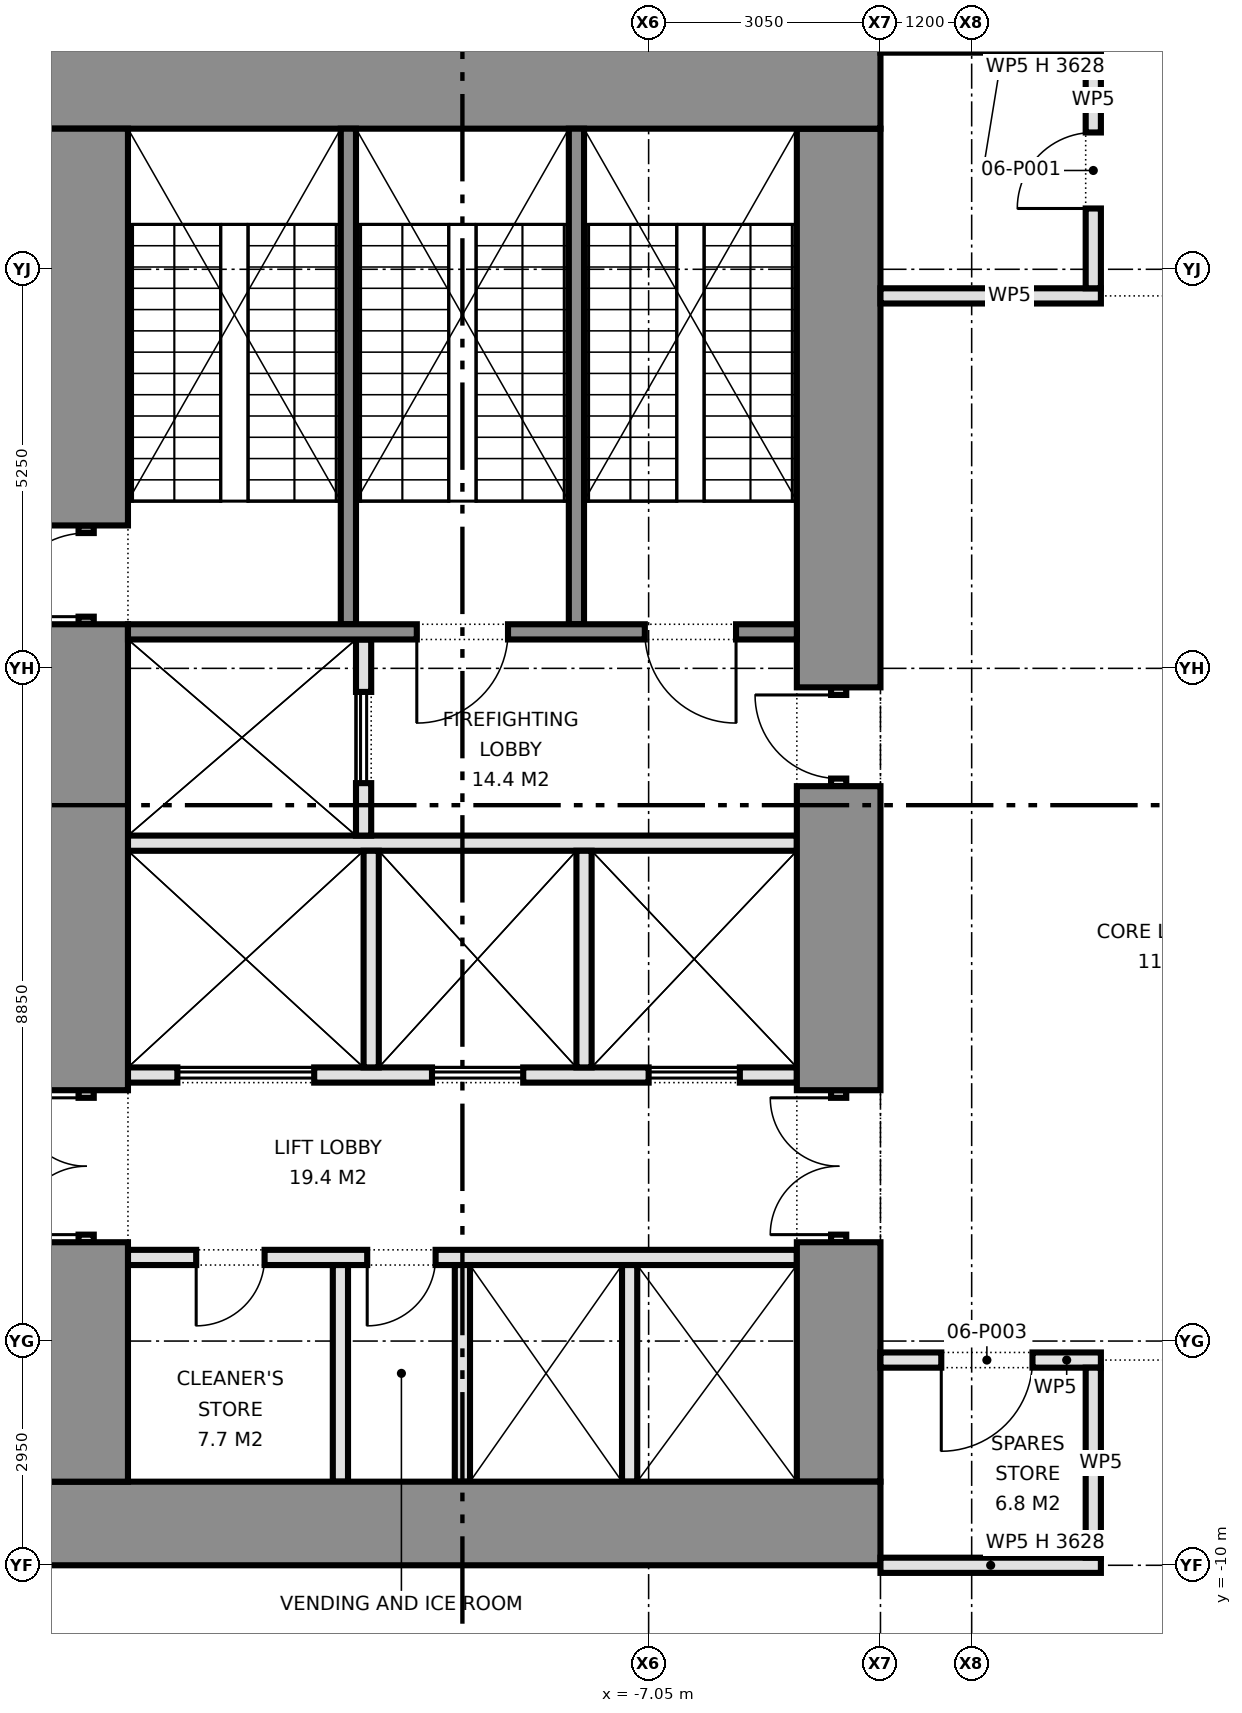
"""IFC4 building model, lengths in metres.
Left out: names, types, materials, properties, quantities, classifications, styles, units other than length and angle.
Written with IfcOpenShell. Run it as: python <this file> out.ifc"""

import sys

from ifc_helpers import new_model, si_unit, direction, frame, frame_2d, origin, place, context, subcontext, project, spatial, rectangle, extrude, element, fill, save


model = new_model("IFC4")
c1 = context("Model", 3, precision=1e-05, world=origin(), true_north=direction((0.0, 1.0)))
c2 = subcontext(c1, "Body", "Model", "MODEL_VIEW")
j1 = project(units=[si_unit("LENGTHUNIT", "METRE"), si_unit("PLANEANGLEUNIT", "RADIAN")], contexts=[c1])
p1 = place(None, origin())
s1 = spatial("IfcSite", under=j1, at=p1, CompositionType="ELEMENT")
p2 = place(p1, origin())
s2 = spatial("IfcBuilding", under=s1, at=p2, CompositionType="ELEMENT")
p3 = place(p2, frame((0.0, 0.0, 25.7)))
s3 = spatial("IfcBuildingStorey", under=s2, at=p3, CompositionType="ELEMENT", Elevation=25.7)
for number, where, z_axis, x_axis in (
    (1, (-15.0, -9.45, 0.0), (0.0, 0.0, 1.0), (1.0, 0.0, 0.0)),
    (2, (-15.0, 9.45, 0.0), (0.0, 0.0, 1.0), (1.0, 0.0, 0.0)),
):
    element("IfcWall", number, at=place(p3, frame(where, z_axis=z_axis, x_axis=x_axis)), inside=s3, PredefinedType="SHEAR", context=c2, shape_type="SweptSolid", body=[
        extrude(rectangle(XDim=11.0, YDim=1.1, at=frame_2d((5.5, 0.0))), origin(), (0.0, 0.0, 1.0), 4.575),
    ])
p4 = place(p3, frame((-14.45, -8.9, 0.0), z_axis=(0.0, 0.0, 1.0), x_axis=(0.0, 1.0, 0.0)))
e3 = element("IfcWall", 3, at=p4, inside=s3, PredefinedType="SHEAR", context=c2, shape_type="SweptSolid", body=[
    extrude(rectangle(XDim=3.15, YDim=1.1, at=frame_2d((1.575, 0.0))), origin(), (0.0, 0.0, 1.0), 4.575),
])
p5 = place(p3, frame((-14.45, -5.75, 0.0), z_axis=(0.0, 0.0, 1.0), x_axis=(0.0, 1.0, 0.0)))
e4 = element("IfcWall", 4, at=p5, inside=s3, PredefinedType="PARTITIONING", context=c2, shape_type="SweptSolid", body=[
    extrude(rectangle(XDim=2.0, YDim=0.2, at=frame_2d((1.0, 0.0))), origin(), (0.0, 0.0, 1.0), 2.4),
])
p6 = place(p5, frame((0.1, 0.0, 0.0)))
e5 = element("IfcOpeningElement", 5, at=p6, cuts=e4, PredefinedType="OPENING", context=c2, shape_type="SweptSolid", body=[
    extrude(rectangle(XDim=1.8, YDim=2.1, at=frame_2d((0.9, 1.05))), frame((0.0, 0.11, 0.0), z_axis=(0.0, -1.0, 0.0), x_axis=(1.0, 0.0, 0.0)), (0.0, 0.0, 1.0), 0.22),
])
p7 = place(p3, frame((-14.45, -3.75, 0.0), z_axis=(0.0, 0.0, 1.0), x_axis=(0.0, 1.0, 0.0)))
e6 = element("IfcWall", 6, at=p7, inside=s3, PredefinedType="SHEAR", context=c2, shape_type="SweptSolid", body=[
    extrude(rectangle(XDim=6.13, YDim=1.1, at=frame_2d((3.065, 0.0))), origin(), (0.0, 0.0, 1.0), 4.575),
])
p8 = place(p3, frame((-14.45, 2.38, 0.0), z_axis=(0.0, 0.0, 1.0), x_axis=(0.0, 1.0, 0.0)))
e7 = element("IfcWall", 7, at=p8, inside=s3, PredefinedType="SHEAR", context=c2, shape_type="SweptSolid", body=[
    extrude(rectangle(XDim=1.3, YDim=0.2, at=frame_2d((0.65, 0.0))), origin(), (0.0, 0.0, 1.0), 2.4),
])
p9 = place(p8, frame((0.1, 0.0, 0.0)))
e8 = element("IfcOpeningElement", 8, at=p9, cuts=e7, PredefinedType="OPENING", context=c2, shape_type="SweptSolid", body=[
    extrude(rectangle(XDim=1.1, YDim=2.1, at=frame_2d((0.55, 1.05))), frame((0.0, 0.11, 0.0), z_axis=(0.0, -1.0, 0.0), x_axis=(1.0, 0.0, 0.0)), (0.0, 0.0, 1.0), 0.22),
])
p10 = place(p3, frame((-14.45, 3.68, 0.0), z_axis=(0.0, 0.0, 1.0), x_axis=(0.0, 1.0, 0.0)))
e9 = element("IfcWall", 9, at=p10, inside=s3, PredefinedType="SHEAR", context=c2, shape_type="SweptSolid", body=[
    extrude(rectangle(XDim=5.22, YDim=1.1, at=frame_2d((2.61, 0.0))), origin(), (0.0, 0.0, 1.0), 4.575),
])
p11 = place(p3, frame((-4.55, -8.9, 0.0), z_axis=(0.0, 0.0, 1.0), x_axis=(0.0, 1.0, 0.0)))
e10 = element("IfcWall", 10, at=p11, inside=s3, PredefinedType="SHEAR", context=c2, shape_type="SweptSolid", body=[
    extrude(rectangle(XDim=3.15, YDim=1.1, at=frame_2d((1.575, 0.0))), origin(), (0.0, 0.0, 1.0), 4.575),
])
p12 = place(p3, frame((-4.55, -5.75, 0.0), z_axis=(0.0, 0.0, 1.0), x_axis=(0.0, 1.0, 0.0)))
e11 = element("IfcWall", 11, at=p12, inside=s3, PredefinedType="PARTITIONING", context=c2, shape_type="SweptSolid", body=[
    extrude(rectangle(XDim=2.0, YDim=0.2, at=frame_2d((1.0, 0.0))), origin(), (0.0, 0.0, 1.0), 2.4),
])
p13 = place(p12, frame((0.1, 0.0, 0.0)))
e12 = element("IfcOpeningElement", 12, at=p13, cuts=e11, PredefinedType="OPENING", context=c2, shape_type="SweptSolid", body=[
    extrude(rectangle(XDim=1.8, YDim=2.1, at=frame_2d((0.9, 1.05))), frame((0.0, 0.11, 0.0), z_axis=(0.0, -1.0, 0.0), x_axis=(1.0, 0.0, 0.0)), (0.0, 0.0, 1.0), 0.22),
])
p14 = place(p3, frame((-4.55, -3.75, 0.0), z_axis=(0.0, 0.0, 1.0), x_axis=(0.0, 1.0, 0.0)))
e13 = element("IfcWall", 13, at=p14, inside=s3, PredefinedType="SHEAR", context=c2, shape_type="SweptSolid", body=[
    extrude(rectangle(XDim=4.0, YDim=1.1, at=frame_2d((2.0, 0.0))), origin(), (0.0, 0.0, 1.0), 4.575),
])
p15 = place(p3, frame((-4.55, 0.25, 0.0), z_axis=(0.0, 0.0, 1.0), x_axis=(0.0, 1.0, 0.0)))
e14 = element("IfcWall", 14, at=p15, inside=s3, PredefinedType="PARTITIONING", context=c2, shape_type="SweptSolid", body=[
    extrude(rectangle(XDim=1.3, YDim=0.2, at=frame_2d((0.65, 0.0))), origin(), (0.0, 0.0, 1.0), 2.4),
])
p16 = place(p15, frame((0.1, 0.0, 0.0)))
e15 = element("IfcOpeningElement", 15, at=p16, cuts=e14, PredefinedType="OPENING", context=c2, shape_type="SweptSolid", body=[
    extrude(rectangle(XDim=1.1, YDim=2.1, at=frame_2d((0.55, 1.05))), frame((0.0, 0.11, 0.0), z_axis=(0.0, -1.0, 0.0), x_axis=(1.0, 0.0, 0.0)), (0.0, 0.0, 1.0), 0.22),
])
p17 = place(p3, frame((-4.55, 1.55, 0.0), z_axis=(0.0, 0.0, 1.0), x_axis=(0.0, 1.0, 0.0)))
e16 = element("IfcWall", 16, at=p17, inside=s3, PredefinedType="SHEAR", context=c2, shape_type="SweptSolid", body=[
    extrude(rectangle(XDim=7.35, YDim=1.1, at=frame_2d((3.675, 0.0))), origin(), (0.0, 0.0, 1.0), 4.575),
])
p18 = place(p3, frame((-13.9, -5.95, 0.0), z_axis=(0.0, 0.0, 1.0), x_axis=(1.0, 0.0, 0.0)))
e17 = element("IfcWall", 17, at=p18, inside=s3, PredefinedType="PARTITIONING", context=c2, shape_type="SweptSolid", body=[
    extrude(rectangle(XDim=8.8, YDim=0.2, at=frame_2d((4.4, 0.0))), origin(), (0.0, 0.0, 1.0), 4.575),
])
p19 = place(p18, frame((0.897, 0.0, 0.0)))
e18 = element("IfcOpeningElement", 18, at=p19, cuts=e17, PredefinedType="OPENING", context=c2, shape_type="SweptSolid", body=[
    extrude(rectangle(XDim=0.9, YDim=2.1, at=frame_2d((0.45, 1.05))), frame((0.0, 0.11, 0.0), z_axis=(0.0, -1.0, 0.0), x_axis=(1.0, 0.0, 0.0)), (0.0, 0.0, 1.0), 0.22),
])
p20 = place(p18, frame((3.147, 0.0, 0.0)))
e19 = element("IfcOpeningElement", 19, at=p20, cuts=e17, PredefinedType="OPENING", context=c2, shape_type="SweptSolid", body=[
    extrude(rectangle(XDim=0.9, YDim=2.1, at=frame_2d((0.45, 1.05))), frame((0.0, 0.11, 0.0), z_axis=(0.0, -1.0, 0.0), x_axis=(1.0, 0.0, 0.0)), (0.0, 0.0, 1.0), 0.22),
])
p21 = place(p3, frame((-13.9, -3.55, 0.0), z_axis=(0.0, 0.0, 1.0), x_axis=(1.0, 0.0, 0.0)))
e20 = element("IfcWall", 20, at=p21, inside=s3, PredefinedType="PARTITIONING", context=c2, shape_type="SweptSolid", body=[
    extrude(rectangle(XDim=8.8, YDim=0.2, at=frame_2d((4.4, 0.0))), origin(), (0.0, 0.0, 1.0), 4.575),
])
p22 = place(p21, frame((0.65, 0.0, 0.0)))
e21 = element("IfcOpeningElement", 21, at=p22, cuts=e20, PredefinedType="OPENING", context=c2, shape_type="SweptSolid", body=[
    extrude(rectangle(XDim=1.8, YDim=2.1, at=frame_2d((0.9, 1.05))), frame((0.0, 0.11, 0.0), z_axis=(0.0, -1.0, 0.0), x_axis=(1.0, 0.0, 0.0)), (0.0, 0.0, 1.0), 0.22),
])
p23 = place(p21, frame((4.0, 0.0, 0.0)))
e22 = element("IfcOpeningElement", 22, at=p23, cuts=e20, PredefinedType="OPENING", context=c2, shape_type="SweptSolid", body=[
    extrude(rectangle(XDim=1.2, YDim=2.1, at=frame_2d((0.6, 1.05))), frame((0.0, 0.11, 0.0), z_axis=(0.0, -1.0, 0.0), x_axis=(1.0, 0.0, 0.0)), (0.0, 0.0, 1.0), 0.22),
])
p24 = place(p21, frame((6.85, 0.0, 0.0)))
e23 = element("IfcOpeningElement", 23, at=p24, cuts=e20, PredefinedType="OPENING", context=c2, shape_type="SweptSolid", body=[
    extrude(rectangle(XDim=1.2, YDim=2.1, at=frame_2d((0.6, 1.05))), frame((0.0, 0.11, 0.0), z_axis=(0.0, -1.0, 0.0), x_axis=(1.0, 0.0, 0.0)), (0.0, 0.0, 1.0), 0.22),
])
p25 = place(p3, frame((-13.9, -0.5, 0.0), z_axis=(0.0, 0.0, 1.0), x_axis=(1.0, 0.0, 0.0)))
e24 = element("IfcWall", 24, at=p25, inside=s3, PredefinedType="PARTITIONING", context=c2, shape_type="SweptSolid", body=[
    extrude(rectangle(XDim=8.8, YDim=0.2, at=frame_2d((4.4, 0.0))), origin(), (0.0, 0.0, 1.0), 4.575),
])
p26 = place(p3, frame((-10.8, -0.4, 0.0), z_axis=(0.0, 0.0, 1.0), x_axis=(0.0, 1.0, 0.0)))
e25 = element("IfcWall", 25, at=p26, inside=s3, PredefinedType="PARTITIONING", context=c2, shape_type="SweptSolid", body=[
    extrude(rectangle(XDim=2.58, YDim=0.2, at=frame_2d((1.29, 0.0))), origin(), (0.0, 0.0, 1.0), 4.575),
])
p27 = place(p26, frame((0.69, 0.0, 0.0)))
e26 = element("IfcOpeningElement", 26, at=p27, cuts=e25, PredefinedType="OPENING", context=c2, shape_type="SweptSolid", body=[
    extrude(rectangle(XDim=1.2, YDim=2.1, at=frame_2d((0.6, 1.05))), frame((0.0, 0.11, 0.0), z_axis=(0.0, -1.0, 0.0), x_axis=(1.0, 0.0, 0.0)), (0.0, 0.0, 1.0), 0.22),
])
p28 = place(p3, frame((-13.9, 2.28, 0.0), z_axis=(0.0, 0.0, 1.0), x_axis=(1.0, 0.0, 0.0)))
e27 = element("IfcWall", 27, at=p28, inside=s3, PredefinedType="SHEAR", context=c2, shape_type="SweptSolid", body=[
    extrude(rectangle(XDim=8.8, YDim=0.2, at=frame_2d((4.4, 0.0))), origin(), (0.0, 0.0, 1.0), 4.575),
])
p29 = place(p28, frame((3.8, 0.0, 0.0)))
e28 = element("IfcOpeningElement", 28, at=p29, cuts=e27, PredefinedType="OPENING", context=c2, shape_type="SweptSolid", body=[
    extrude(rectangle(XDim=1.2, YDim=2.1, at=frame_2d((0.6, 1.05))), frame((0.0, 0.11, 0.0), z_axis=(0.0, -1.0, 0.0), x_axis=(1.0, 0.0, 0.0)), (0.0, 0.0, 1.0), 0.22),
])
p30 = place(p28, frame((6.8, 0.0, 0.0)))
e29 = element("IfcOpeningElement", 29, at=p30, cuts=e27, PredefinedType="OPENING", context=c2, shape_type="SweptSolid", body=[
    extrude(rectangle(XDim=1.2, YDim=2.1, at=frame_2d((0.6, 1.05))), frame((0.0, 0.11, 0.0), z_axis=(0.0, -1.0, 0.0), x_axis=(1.0, 0.0, 0.0)), (0.0, 0.0, 1.0), 0.22),
])
for number, where, z_axis, x_axis in (
    (30, (-11.0, 2.38, 0.0), (0.0, 0.0, 1.0), (0.0, 1.0, 0.0)),
    (31, (-8.0, 2.38, 0.0), (0.0, 0.0, 1.0), (0.0, 1.0, 0.0)),
):
    element("IfcWall", number, at=place(p3, frame(where, z_axis=z_axis, x_axis=x_axis)), inside=s3, PredefinedType="SHEAR", context=c2, shape_type="SweptSolid", body=[
        extrude(rectangle(XDim=6.52, YDim=0.2, at=frame_2d((3.26, 0.0))), origin(), (0.0, 0.0, 1.0), 4.575),
    ])
for number, where, z_axis, x_axis in (
    (32, (-9.5, -8.9, 0.0), (0.0, 0.0, 1.0), (0.0, 1.0, 0.0)),
    (33, (-7.3, -8.9, 0.0), (0.0, 0.0, 1.0), (0.0, 1.0, 0.0)),
    (34, (-11.105, -8.9, 0.0), (0.0, 0.0, 1.0), (0.0, 1.0, 0.0)),
    (35, (-10.7, -3.45, 0.0), (0.0, 0.0, 1.0), (0.0, 1.0, 0.0)),
    (36, (-7.9, -3.45, 0.0), (0.0, 0.0, 1.0), (0.0, 1.0, 0.0)),
):
    element("IfcWall", number, at=place(p3, frame(where, z_axis=z_axis, x_axis=x_axis)), inside=s3, PredefinedType="PARTITIONING", context=c2, shape_type="SweptSolid", body=[
        extrude(rectangle(XDim=2.85, YDim=0.2, at=frame_2d((1.425, 0.0))), origin(), (0.0, 0.0, 1.0), 4.575),
    ])
p31 = place(p3, frame((-4.0, -10.0, 0.0), z_axis=(0.0, 0.0, 1.0), x_axis=(1.0, 0.0, 0.0)))
e37 = element("IfcWall", 37, at=p31, inside=s3, PredefinedType="PARTITIONING", context=c2, shape_type="SweptSolid", body=[
    extrude(rectangle(XDim=2.9, YDim=0.2, at=frame_2d((1.45, 0.0))), origin(), (0.0, 0.0, 1.0), 3.628),
])
p32 = place(p3, frame((-4.0, -7.3, 0.0), z_axis=(0.0, 0.0, 1.0), x_axis=(1.0, 0.0, 0.0)))
e38 = element("IfcWall", 38, at=p32, inside=s3, PredefinedType="PARTITIONING", context=c2, shape_type="SweptSolid", body=[
    extrude(rectangle(XDim=2.9, YDim=0.2, at=frame_2d((1.45, 0.0))), origin(), (0.0, 0.0, 1.0), 4.575),
])
p33 = place(p32, frame((0.8, 0.0, 0.0)))
e39 = element("IfcOpeningElement", 39, at=p33, cuts=e38, PredefinedType="OPENING", context=c2, shape_type="SweptSolid", body=[
    extrude(rectangle(XDim=1.2, YDim=2.1, at=frame_2d((0.6, 1.05))), frame((0.0, 0.11, 0.0), z_axis=(0.0, -1.0, 0.0), x_axis=(1.0, 0.0, 0.0)), (0.0, 0.0, 1.0), 0.22),
])
p34 = place(p3, frame((-4.0, 6.7, 0.0), z_axis=(0.0, 0.0, 1.0), x_axis=(1.0, 0.0, 0.0)))
e40 = element("IfcWall", 40, at=p34, inside=s3, PredefinedType="PARTITIONING", context=c2, shape_type="SweptSolid", body=[
    extrude(rectangle(XDim=2.9, YDim=0.2, at=frame_2d((1.45, 0.0))), origin(), (0.0, 0.0, 1.0), 4.575),
])
p35 = place(p3, frame((-1.2, -9.9, 0.0), z_axis=(0.0, 0.0, 1.0), x_axis=(0.0, 1.0, 0.0)))
e41 = element("IfcWall", 41, at=p35, inside=s3, PredefinedType="PARTITIONING", context=c2, shape_type="SweptSolid", body=[
    extrude(rectangle(XDim=2.5, YDim=0.2, at=frame_2d((1.25, 0.0))), origin(), (0.0, 0.0, 1.0), 4.575),
])
p36 = place(p3, frame((-1.2, 6.8, 0.0), z_axis=(0.0, 0.0, 1.0), x_axis=(0.0, 1.0, 0.0)))
e42 = element("IfcWall", 42, at=p36, inside=s3, PredefinedType="PARTITIONING", context=c2, shape_type="SweptSolid", body=[
    extrude(rectangle(XDim=3.1, YDim=0.2, at=frame_2d((1.55, 0.0))), origin(), (0.0, 0.0, 1.0), 4.575),
])
p37 = place(p36, frame((1.05, 0.0, 0.0)))
e43 = element("IfcOpeningElement", 43, at=p37, cuts=e42, PredefinedType="OPENING", context=c2, shape_type="SweptSolid", body=[
    extrude(rectangle(XDim=1.0, YDim=2.1, at=frame_2d((0.5, 1.05))), frame((0.0, 0.11, 0.0), z_axis=(0.0, -1.0, 0.0), x_axis=(1.0, 0.0, 0.0)), (0.0, 0.0, 1.0), 0.22),
])
p38 = place(p6, origin())
e44 = element("IfcDoor", 44, at=p38, inside=s3, OperationType="DOUBLE_DOOR_SINGLE_SWING", PredefinedType="DOOR", context=c2, shape_type="SweptSolid", body=[
    extrude(rectangle(XDim=1.8, YDim=2.1, at=frame_2d((0.9, 1.05))), frame((0.0, 0.025, 0.0), z_axis=(0.0, -1.0, 0.0), x_axis=(1.0, 0.0, 0.0)), (0.0, 0.0, 1.0), 0.05),
])
fill(e5, e44)
p39 = place(p9, origin())
e45 = element("IfcDoor", 45, at=p39, inside=s3, OperationType="SINGLE_SWING_LEFT", PredefinedType="DOOR", context=c2, shape_type="SweptSolid", body=[
    extrude(rectangle(XDim=1.1, YDim=2.1, at=frame_2d((0.55, 1.05))), frame((0.0, 0.025, 0.0), z_axis=(0.0, -1.0, 0.0), x_axis=(1.0, 0.0, 0.0)), (0.0, 0.0, 1.0), 0.05),
])
fill(e8, e45)
p40 = place(p13, origin())
e46 = element("IfcDoor", 46, at=p40, inside=s3, OperationType="DOUBLE_DOOR_SINGLE_SWING", PredefinedType="DOOR", context=c2, shape_type="SweptSolid", body=[
    extrude(rectangle(XDim=1.8, YDim=2.1, at=frame_2d((0.9, 1.05))), frame((0.0, 0.025, 0.0), z_axis=(0.0, -1.0, 0.0), x_axis=(1.0, 0.0, 0.0)), (0.0, 0.0, 1.0), 0.05),
])
fill(e12, e46)
p41 = place(p16, origin())
e47 = element("IfcDoor", 47, at=p41, inside=s3, OperationType="SINGLE_SWING_RIGHT", PredefinedType="DOOR", context=c2, shape_type="SweptSolid", body=[
    extrude(rectangle(XDim=1.1, YDim=2.1, at=frame_2d((0.55, 1.05))), frame((0.0, 0.025, 0.0), z_axis=(0.0, -1.0, 0.0), x_axis=(1.0, 0.0, 0.0)), (0.0, 0.0, 1.0), 0.05),
])
fill(e15, e47)
p42 = place(p22, origin())
e48 = element("IfcDoor", 48, at=p42, inside=s3, OperationType="DOUBLE_DOOR_SLIDING", PredefinedType="DOOR", context=c2, shape_type="SweptSolid", body=[
    extrude(rectangle(XDim=1.8, YDim=2.1, at=frame_2d((0.9, 1.05))), frame((0.0, 0.025, 0.0), z_axis=(0.0, -1.0, 0.0), x_axis=(1.0, 0.0, 0.0)), (0.0, 0.0, 1.0), 0.05),
])
fill(e21, e48)
p43 = place(p23, origin())
e49 = element("IfcDoor", 49, at=p43, inside=s3, OperationType="DOUBLE_DOOR_SLIDING", PredefinedType="DOOR", context=c2, shape_type="SweptSolid", body=[
    extrude(rectangle(XDim=1.2, YDim=2.1, at=frame_2d((0.6, 1.05))), frame((0.0, 0.025, 0.0), z_axis=(0.0, -1.0, 0.0), x_axis=(1.0, 0.0, 0.0)), (0.0, 0.0, 1.0), 0.05),
])
fill(e22, e49)
p44 = place(p24, origin())
e50 = element("IfcDoor", 50, at=p44, inside=s3, OperationType="DOUBLE_DOOR_SLIDING", PredefinedType="DOOR", context=c2, shape_type="SweptSolid", body=[
    extrude(rectangle(XDim=1.2, YDim=2.1, at=frame_2d((0.6, 1.05))), frame((0.0, 0.025, 0.0), z_axis=(0.0, -1.0, 0.0), x_axis=(1.0, 0.0, 0.0)), (0.0, 0.0, 1.0), 0.05),
])
fill(e23, e50)
p45 = place(p27, origin())
e51 = element("IfcDoor", 51, at=p45, inside=s3, OperationType="DOUBLE_DOOR_SLIDING", PredefinedType="DOOR", context=c2, shape_type="SweptSolid", body=[
    extrude(rectangle(XDim=1.2, YDim=2.1, at=frame_2d((0.6, 1.05))), frame((0.0, 0.025, 0.0), z_axis=(0.0, -1.0, 0.0), x_axis=(1.0, 0.0, 0.0)), (0.0, 0.0, 1.0), 0.05),
])
fill(e26, e51)
p46 = place(p19, frame((0.9, 0.0, 0.0), z_axis=(0.0, 0.0, 1.0), x_axis=(-1.0, 0.0, 0.0)))
e52 = element("IfcDoor", 52, at=p46, inside=s3, OperationType="SINGLE_SWING_RIGHT", PredefinedType="DOOR", context=c2, shape_type="SweptSolid", body=[
    extrude(rectangle(XDim=0.9, YDim=2.1, at=frame_2d((0.45, 1.05))), frame((0.0, 0.025, 0.0), z_axis=(0.0, -1.0, 0.0), x_axis=(1.0, 0.0, 0.0)), (0.0, 0.0, 1.0), 0.05),
])
fill(e18, e52)
p47 = place(p20, frame((0.9, 0.0, 0.0), z_axis=(0.0, 0.0, 1.0), x_axis=(-1.0, 0.0, 0.0)))
e53 = element("IfcDoor", 53, at=p47, inside=s3, OperationType="SINGLE_SWING_RIGHT", PredefinedType="DOOR", context=c2, shape_type="SweptSolid", body=[
    extrude(rectangle(XDim=0.9, YDim=2.1, at=frame_2d((0.45, 1.05))), frame((0.0, 0.025, 0.0), z_axis=(0.0, -1.0, 0.0), x_axis=(1.0, 0.0, 0.0)), (0.0, 0.0, 1.0), 0.05),
])
fill(e19, e53)
p48 = place(p29, frame((1.2, 0.0, 0.0), z_axis=(0.0, 0.0, 1.0), x_axis=(-1.0, 0.0, 0.0)))
e54 = element("IfcDoor", 54, at=p48, inside=s3, OperationType="SINGLE_SWING_RIGHT", PredefinedType="DOOR", context=c2, shape_type="SweptSolid", body=[
    extrude(rectangle(XDim=1.2, YDim=2.1, at=frame_2d((0.6, 1.05))), frame((0.0, 0.025, 0.0), z_axis=(0.0, -1.0, 0.0), x_axis=(1.0, 0.0, 0.0)), (0.0, 0.0, 1.0), 0.05),
])
fill(e28, e54)
p49 = place(p30, frame((1.2, 0.0, 0.0), z_axis=(0.0, 0.0, 1.0), x_axis=(-1.0, 0.0, 0.0)))
e55 = element("IfcDoor", 55, at=p49, inside=s3, OperationType="SINGLE_SWING_LEFT", PredefinedType="DOOR", context=c2, shape_type="SweptSolid", body=[
    extrude(rectangle(XDim=1.2, YDim=2.1, at=frame_2d((0.6, 1.05))), frame((0.0, 0.025, 0.0), z_axis=(0.0, -1.0, 0.0), x_axis=(1.0, 0.0, 0.0)), (0.0, 0.0, 1.0), 0.05),
])
fill(e29, e55)
p50 = place(p37, origin())
e56 = element("IfcDoor", 56, at=p50, inside=s3, OperationType="SINGLE_SWING_LEFT", PredefinedType="DOOR", context=c2, shape_type="SweptSolid", body=[
    extrude(rectangle(XDim=1.0, YDim=2.1, at=frame_2d((0.5, 1.05))), frame((0.0, 0.025, 0.0), z_axis=(0.0, -1.0, 0.0), x_axis=(1.0, 0.0, 0.0)), (0.0, 0.0, 1.0), 0.05),
])
fill(e43, e56)
p51 = place(p33, frame((1.2, 0.0, 0.0), z_axis=(0.0, 0.0, 1.0), x_axis=(-1.0, 0.0, 0.0)))
e57 = element("IfcDoor", 57, at=p51, inside=s3, OperationType="SINGLE_SWING_RIGHT", PredefinedType="DOOR", context=c2, shape_type="SweptSolid", body=[
    extrude(rectangle(XDim=1.2, YDim=2.1, at=frame_2d((0.6, 1.05))), frame((0.0, 0.025, 0.0), z_axis=(0.0, -1.0, 0.0), x_axis=(1.0, 0.0, 0.0)), (0.0, 0.0, 1.0), 0.05),
])
fill(e39, e57)
save(model, sys.argv[1])
